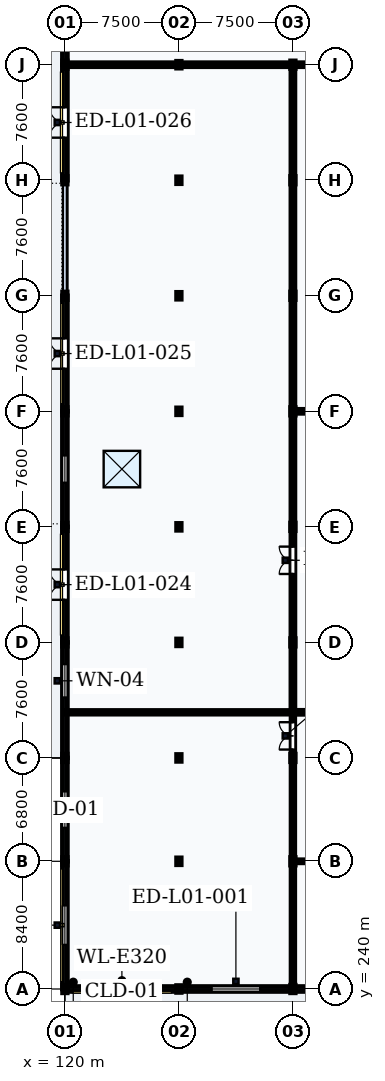
"""IFC4 building model, lengths in metres.
Left out: names, types, materials, properties, quantities, classifications, styles, units other than length and angle.
Written with IfcOpenShell. Run it as: python <this file> out.ifc"""

import sys

from ifc_helpers import new_model, si_unit, direction, frame, frame_2d, origin, origin_2d, place, context, subcontext, project, spatial, rectangle, i_section, extrude, element, fill, save


model = new_model("IFC4")
c1 = context("Model", 3, precision=1e-05, world=origin(), true_north=direction((0.0, 1.0)))
c2 = subcontext(c1, "Body", "Model", "MODEL_VIEW")
j1 = project(units=[si_unit("LENGTHUNIT", "METRE"), si_unit("PLANEANGLEUNIT", "RADIAN")], contexts=[c1])
p1 = place(None, origin())
s1 = spatial("IfcSite", under=j1, at=p1, CompositionType="ELEMENT")
p2 = place(p1, origin())
s2 = spatial("IfcBuilding", under=s1, at=p2, CompositionType="ELEMENT")
p3 = place(p2, origin())
s3 = spatial("IfcBuildingStorey", under=s2, at=p3, CompositionType="ELEMENT", Elevation=0.0)
for number, where, z_axis, x_axis in (
    (1, (120.0, 240.0, 0.0), (0.0, 0.0, 1.0), (1.0, 0.0, 0.0)),
    (2, (120.0, 248.4, 0.0), (0.0, 0.0, 1.0), (1.0, 0.0, 0.0)),
    (3, (120.0, 255.2, 0.0), (0.0, 0.0, 1.0), (1.0, 0.0, 0.0)),
    (4, (120.0, 262.8, 0.0), (0.0, 0.0, 1.0), (1.0, 0.0, 0.0)),
    (5, (120.0, 270.4, 0.0), (0.0, 0.0, 1.0), (1.0, 0.0, 0.0)),
    (6, (120.0, 278.0, 0.0), (0.0, 0.0, 1.0), (1.0, 0.0, 0.0)),
    (7, (120.0, 285.6, 0.0), (0.0, 0.0, 1.0), (1.0, 0.0, 0.0)),
    (8, (120.0, 293.2, 0.0), (0.0, 0.0, 1.0), (1.0, 0.0, 0.0)),
    (9, (120.0, 300.8, 0.0), (0.0, 0.0, 1.0), (1.0, 0.0, 0.0)),
):
    element("IfcColumn", number, at=place(p3, frame(where, z_axis=z_axis, x_axis=x_axis)), inside=s3, PredefinedType="COLUMN", context=c2, shape_type="SweptSolid", body=[
        extrude(i_section(OverallWidth=0.3, OverallDepth=0.5, WebThickness=0.014, FlangeThickness=0.028, FilletRadius=0.027, at=origin_2d()), origin(), (0.0, 0.0, 1.0), 5.4),
    ])
for number, where, z_axis, x_axis in (
    (10, (127.5, 240.0, 0.0), (0.0, 0.0, 1.0), (1.0, 0.0, 0.0)),
    (11, (127.5, 248.4, 0.0), (0.0, 0.0, 1.0), (1.0, 0.0, 0.0)),
    (12, (127.5, 255.2, 0.0), (0.0, 0.0, 1.0), (1.0, 0.0, 0.0)),
    (13, (127.5, 262.8, 0.0), (0.0, 0.0, 1.0), (1.0, 0.0, 0.0)),
    (14, (127.5, 270.4, 0.0), (0.0, 0.0, 1.0), (1.0, 0.0, 0.0)),
    (15, (127.5, 278.0, 0.0), (0.0, 0.0, 1.0), (1.0, 0.0, 0.0)),
    (16, (127.5, 285.6, 0.0), (0.0, 0.0, 1.0), (1.0, 0.0, 0.0)),
    (17, (127.5, 293.2, 0.0), (0.0, 0.0, 1.0), (1.0, 0.0, 0.0)),
    (18, (127.5, 300.8, 0.0), (0.0, 0.0, 1.0), (1.0, 0.0, 0.0)),
):
    element("IfcColumn", number, at=place(p3, frame(where, z_axis=z_axis, x_axis=x_axis)), inside=s3, PredefinedType="COLUMN", context=c2, shape_type="SweptSolid", body=[
        extrude(i_section(OverallWidth=0.3, OverallDepth=0.45, WebThickness=0.014, FlangeThickness=0.026, FilletRadius=0.027, at=origin_2d()), origin(), (0.0, 0.0, 1.0), 5.4),
    ])
for number, where, z_axis, x_axis in (
    (19, (135.0, 240.0, 0.0), (0.0, 0.0, 1.0), (1.0, 0.0, 0.0)),
    (20, (135.0, 248.4, 0.0), (0.0, 0.0, 1.0), (1.0, 0.0, 0.0)),
    (21, (135.0, 255.2, 0.0), (0.0, 0.0, 1.0), (1.0, 0.0, 0.0)),
    (22, (135.0, 262.8, 0.0), (0.0, 0.0, 1.0), (1.0, 0.0, 0.0)),
    (23, (135.0, 270.4, 0.0), (0.0, 0.0, 1.0), (1.0, 0.0, 0.0)),
    (24, (135.0, 278.0, 0.0), (0.0, 0.0, 1.0), (1.0, 0.0, 0.0)),
    (25, (135.0, 285.6, 0.0), (0.0, 0.0, 1.0), (1.0, 0.0, 0.0)),
    (26, (135.0, 293.2, 0.0), (0.0, 0.0, 1.0), (1.0, 0.0, 0.0)),
    (27, (135.0, 300.8, 0.0), (0.0, 0.0, 1.0), (1.0, 0.0, 0.0)),
):
    element("IfcColumn", number, at=place(p3, frame(where, z_axis=z_axis, x_axis=x_axis)), inside=s3, PredefinedType="COLUMN", context=c2, shape_type="SweptSolid", body=[
        extrude(i_section(OverallWidth=0.3, OverallDepth=0.5, WebThickness=0.014, FlangeThickness=0.028, FilletRadius=0.027, at=origin_2d()), origin(), (0.0, 0.0, 1.0), 5.4),
    ])
p4 = place(p3, frame((120.006, 240.0, 0.0), z_axis=(0.0, 0.0, 1.0), x_axis=(1.0, 0.0, 0.0)))
e28 = element("IfcWall", 28, at=p4, inside=s3, PredefinedType="SOLIDWALL", context=c2, shape_type="SweptSolid", body=[
    extrude(rectangle(XDim=7.488, YDim=0.32, at=frame_2d((3.744, 0.0))), origin(), (0.0, 0.0, 1.0), 4.878),
])
p5 = place(p4, frame((2.344, 0.0, 0.95)))
e29 = element("IfcOpeningElement", 29, at=p5, cuts=e28, PredefinedType="OPENING", context=c2, shape_type="SweptSolid", body=[
    extrude(rectangle(XDim=2.8, YDim=3.2, at=frame_2d((1.4, 1.6))), frame((0.0, 0.175, 0.0), z_axis=(0.0, -1.0, 0.0), x_axis=(1.0, 0.0, 0.0)), (0.0, 0.0, 1.0), 0.35),
])
p6 = place(p3, frame((127.506, 240.0, 0.0), z_axis=(0.0, 0.0, 1.0), x_axis=(1.0, 0.0, 0.0)))
e30 = element("IfcWall", 30, at=p6, inside=s3, PredefinedType="SOLIDWALL", context=c2, shape_type="SweptSolid", body=[
    extrude(rectangle(XDim=7.488, YDim=0.32, at=frame_2d((3.744, 0.0))), origin(), (0.0, 0.0, 1.0), 4.878),
])
p7 = place(p6, frame((2.144, 0.0, 0.0)))
e31 = element("IfcOpeningElement", 31, at=p7, cuts=e30, PredefinedType="OPENING", context=c2, shape_type="SweptSolid", body=[
    extrude(rectangle(XDim=3.2, YDim=3.0, at=frame_2d((1.6, 1.5))), frame((0.0, 0.175, 0.0), z_axis=(0.0, -1.0, 0.0), x_axis=(1.0, 0.0, 0.0)), (0.0, 0.0, 1.0), 0.35),
])
p8 = place(p3, frame((135.006, 240.0, 0.0), z_axis=(0.0, 0.0, 1.0), x_axis=(1.0, 0.0, 0.0)))
e32 = element("IfcWall", 32, at=p8, inside=s3, PredefinedType="SOLIDWALL", context=c2, shape_type="SweptSolid", body=[
    extrude(rectangle(XDim=7.488, YDim=0.32, at=frame_2d((3.744, 0.0))), origin(), (0.0, 0.0, 1.0), 4.878),
])
p9 = place(p8, frame((2.544, 0.0, 0.95)))
e33 = element("IfcOpeningElement", 33, at=p9, cuts=e32, PredefinedType="OPENING", context=c2, shape_type="SweptSolid", body=[
    extrude(rectangle(XDim=2.4, YDim=2.8, at=frame_2d((1.2, 1.4))), frame((0.0, 0.175, 0.0), z_axis=(0.0, -1.0, 0.0), x_axis=(1.0, 0.0, 0.0)), (0.0, 0.0, 1.0), 0.35),
])
p10 = place(p3, frame((120.0, 240.006, 0.0), z_axis=(0.0, 0.0, 1.0), x_axis=(0.0, 1.0, 0.0)))
e34 = element("IfcWall", 34, at=p10, inside=s3, PredefinedType="SOLIDWALL", context=c2, shape_type="SweptSolid", body=[
    extrude(rectangle(XDim=8.388, YDim=0.32, at=frame_2d((4.194, 0.0))), origin(), (0.0, 0.0, 1.0), 4.838),
])
p11 = place(p10, frame((2.894, 0.0, 0.95)))
e35 = element("IfcOpeningElement", 35, at=p11, cuts=e34, PredefinedType="OPENING", context=c2, shape_type="SweptSolid", body=[
    extrude(rectangle(XDim=2.6, YDim=3.0, at=frame_2d((1.3, 1.5))), frame((0.0, 0.175, 0.0), z_axis=(0.0, -1.0, 0.0), x_axis=(1.0, 0.0, 0.0)), (0.0, 0.0, 1.0), 0.35),
])
p12 = place(p3, frame((120.0, 248.406, 0.0), z_axis=(0.0, 0.0, 1.0), x_axis=(0.0, 1.0, 0.0)))
e36 = element("IfcWall", 36, at=p12, inside=s3, PredefinedType="SOLIDWALL", context=c2, shape_type="SweptSolid", body=[
    extrude(rectangle(XDim=6.788, YDim=0.32, at=frame_2d((3.394, 0.0))), origin(), (0.0, 0.0, 1.0), 4.918),
])
p13 = place(p12, frame((2.194, 0.0, 0.95)))
e37 = element("IfcOpeningElement", 37, at=p13, cuts=e36, PredefinedType="OPENING", context=c2, shape_type="SweptSolid", body=[
    extrude(rectangle(XDim=2.4, YDim=2.8, at=frame_2d((1.2, 1.4))), frame((0.0, 0.175, 0.0), z_axis=(0.0, -1.0, 0.0), x_axis=(1.0, 0.0, 0.0)), (0.0, 0.0, 1.0), 0.35),
])
p14 = place(p3, frame((120.0, 255.206, 0.0), z_axis=(0.0, 0.0, 1.0), x_axis=(0.0, 1.0, 0.0)))
e38 = element("IfcWall", 38, at=p14, inside=s3, PredefinedType="SOLIDWALL", context=c2, shape_type="SweptSolid", body=[
    extrude(rectangle(XDim=7.588, YDim=0.32, at=frame_2d((3.794, 0.0))), origin(), (0.0, 0.0, 1.0), 4.878),
])
p15 = place(p14, frame((3.966, 0.0, 0.95)))
e39 = element("IfcOpeningElement", 39, at=p15, cuts=e38, PredefinedType="OPENING", context=c2, shape_type="SweptSolid", body=[
    extrude(rectangle(XDim=2.2, YDim=2.8, at=frame_2d((1.1, 1.4))), frame((0.0, 0.175, 0.0), z_axis=(0.0, -1.0, 0.0), x_axis=(1.0, 0.0, 0.0)), (0.0, 0.0, 1.0), 0.35),
])
p16 = place(p3, frame((120.0, 262.806, 0.0), z_axis=(0.0, 0.0, 1.0), x_axis=(0.0, 1.0, 0.0)))
e40 = element("IfcWall", 40, at=p16, inside=s3, PredefinedType="SOLIDWALL", context=c2, shape_type="SweptSolid", body=[
    extrude(rectangle(XDim=7.588, YDim=0.32, at=frame_2d((3.794, 0.0))), origin(), (0.0, 0.0, 1.0), 4.878),
])
p17 = place(p16, frame((2.794, 0.0, 0.0)))
e41 = element("IfcOpeningElement", 41, at=p17, cuts=e40, PredefinedType="OPENING", context=c2, shape_type="SweptSolid", body=[
    extrude(rectangle(XDim=2.0, YDim=2.55, at=frame_2d((1.0, 1.275))), frame((0.0, 0.175, 0.0), z_axis=(0.0, -1.0, 0.0), x_axis=(1.0, 0.0, 0.0)), (0.0, 0.0, 1.0), 0.35),
])
p18 = place(p3, frame((120.0, 270.406, 0.0), z_axis=(0.0, 0.0, 1.0), x_axis=(0.0, 1.0, 0.0)))
e42 = element("IfcWall", 42, at=p18, inside=s3, PredefinedType="SOLIDWALL", context=c2, shape_type="SweptSolid", body=[
    extrude(rectangle(XDim=7.588, YDim=0.32, at=frame_2d((3.794, 0.0))), origin(), (0.0, 0.0, 1.0), 4.878),
])
p19 = place(p18, frame((2.894, 0.0, 0.95)))
e43 = element("IfcOpeningElement", 43, at=p19, cuts=e42, PredefinedType="OPENING", context=c2, shape_type="SweptSolid", body=[
    extrude(rectangle(XDim=1.8, YDim=2.6, at=frame_2d((0.9, 1.3))), frame((0.0, 0.175, 0.0), z_axis=(0.0, -1.0, 0.0), x_axis=(1.0, 0.0, 0.0)), (0.0, 0.0, 1.0), 0.35),
])
p20 = place(p3, frame((120.0, 278.006, 0.0), z_axis=(0.0, 0.0, 1.0), x_axis=(0.0, 1.0, 0.0)))
e44 = element("IfcWall", 44, at=p20, inside=s3, PredefinedType="SOLIDWALL", context=c2, shape_type="SweptSolid", body=[
    extrude(rectangle(XDim=7.588, YDim=0.32, at=frame_2d((3.794, 0.0))), origin(), (0.0, 0.0, 1.0), 4.878),
])
p21 = place(p20, frame((2.794, 0.0, 0.0)))
e45 = element("IfcOpeningElement", 45, at=p21, cuts=e44, PredefinedType="OPENING", context=c2, shape_type="SweptSolid", body=[
    extrude(rectangle(XDim=2.0, YDim=2.55, at=frame_2d((1.0, 1.275))), frame((0.0, 0.175, 0.0), z_axis=(0.0, -1.0, 0.0), x_axis=(1.0, 0.0, 0.0)), (0.0, 0.0, 1.0), 0.35),
])
p22 = place(p3, frame((120.0, 293.206, 0.0), z_axis=(0.0, 0.0, 1.0), x_axis=(0.0, 1.0, 0.0)))
e46 = element("IfcWall", 46, at=p22, inside=s3, PredefinedType="SOLIDWALL", context=c2, shape_type="SweptSolid", body=[
    extrude(rectangle(XDim=7.588, YDim=0.32, at=frame_2d((3.794, 0.0))), origin(), (0.0, 0.0, 1.0), 4.878),
])
p23 = place(p22, frame((2.794, 0.0, 0.0)))
e47 = element("IfcOpeningElement", 47, at=p23, cuts=e46, PredefinedType="OPENING", context=c2, shape_type="SweptSolid", body=[
    extrude(rectangle(XDim=2.0, YDim=2.55, at=frame_2d((1.0, 1.275))), frame((0.0, 0.175, 0.0), z_axis=(0.0, -1.0, 0.0), x_axis=(1.0, 0.0, 0.0)), (0.0, 0.0, 1.0), 0.35),
])
p24 = place(p3, frame((120.0, 300.806, 0.0), z_axis=(0.0, 0.0, 1.0), x_axis=(0.0, 1.0, 0.0)))
e48 = element("IfcWall", 48, at=p24, inside=s3, PredefinedType="SOLIDWALL", context=c2, shape_type="SweptSolid", body=[
    extrude(rectangle(XDim=7.588, YDim=0.32, at=frame_2d((3.794, 0.0))), origin(), (0.0, 0.0, 1.0), 4.878),
])
p25 = place(p24, frame((2.494, 0.0, 0.95)))
e49 = element("IfcOpeningElement", 49, at=p25, cuts=e48, PredefinedType="OPENING", context=c2, shape_type="SweptSolid", body=[
    extrude(rectangle(XDim=2.6, YDim=3.0, at=frame_2d((1.3, 1.5))), frame((0.0, 0.175, 0.0), z_axis=(0.0, -1.0, 0.0), x_axis=(1.0, 0.0, 0.0)), (0.0, 0.0, 1.0), 0.35),
])
p26 = place(p3, frame((120.1, 240.1, 5.4), z_axis=(0.0, 0.0, 1.0), x_axis=(1.0, 0.0, 0.0)))
e50 = element("IfcWall", 50, at=p26, inside=s3, PredefinedType="PARAPET", context=c2, shape_type="SweptSolid", body=[
    extrude(rectangle(XDim=167.8, YDim=0.18, at=frame_2d((83.9, 0.0))), origin(), (0.0, 0.0, 1.0), 1.2),
])
p27 = place(p3, frame((120.1, 240.2, 5.4), z_axis=(0.0, 0.0, 1.0), x_axis=(0.0, 1.0, 0.0)))
e51 = element("IfcWall", 51, at=p27, inside=s3, PredefinedType="PARAPET", context=c2, shape_type="SweptSolid", body=[
    extrude(rectangle(XDim=8.0, YDim=0.18, at=frame_2d((4.0, 0.0))), origin(), (0.0, 0.0, 1.0), 1.2),
])
p28 = place(p3, frame((120.1, 248.6, 5.4), z_axis=(0.0, 0.0, 1.0), x_axis=(0.0, 1.0, 0.0)))
e52 = element("IfcWall", 52, at=p28, inside=s3, PredefinedType="PARAPET", context=c2, shape_type="SweptSolid", body=[
    extrude(rectangle(XDim=105.2, YDim=0.18, at=frame_2d((52.6, 0.0))), origin(), (0.0, 0.0, 1.0), 1.2),
])
p29 = place(p3, frame((135.0, 240.0, 0.0), z_axis=(0.0, 0.0, 1.0), x_axis=(0.0, 1.0, 0.0)))
e53 = element("IfcWall", 53, at=p29, inside=s3, PredefinedType="PARTITIONING", context=c2, shape_type="SweptSolid", body=[
    extrude(rectangle(XDim=18.2, YDim=0.24, at=frame_2d((9.1, 0.0))), origin(), (0.0, 0.0, 1.0), 4.688),
])
p30 = place(p29, frame((15.75, 0.0, 0.0)))
e54 = element("IfcOpeningElement", 54, at=p30, cuts=e53, PredefinedType="OPENING", context=c2, shape_type="SweptSolid", body=[
    extrude(rectangle(XDim=1.8, YDim=2.25, at=frame_2d((0.9, 1.125))), frame((0.0, 0.135, 0.0), z_axis=(0.0, -1.0, 0.0), x_axis=(1.0, 0.0, 0.0)), (0.0, 0.0, 1.0), 0.27),
])
p31 = place(p3, frame((120.0, 258.2, 0.0), z_axis=(0.0, 0.0, 1.0), x_axis=(1.0, 0.0, 0.0)))
e55 = element("IfcWall", 55, at=p31, inside=s3, PredefinedType="PARTITIONING", context=c2, shape_type="SweptSolid", body=[
    extrude(rectangle(XDim=15.0, YDim=0.24, at=frame_2d((7.5, 0.0))), origin(), (0.0, 0.0, 1.0), 5.14),
])
p32 = place(p3, frame((135.0, 248.4, 0.0), z_axis=(0.0, 0.0, 1.0), x_axis=(1.0, 0.0, 0.0)))
e56 = element("IfcWall", 56, at=p32, inside=s3, PredefinedType="PARTITIONING", context=c2, shape_type="SweptSolid", body=[
    extrude(rectangle(XDim=15.0, YDim=0.2, at=frame_2d((7.5, 0.0))), origin(), (0.0, 0.0, 1.0), 4.778),
])
p33 = place(p32, frame((8.04, 0.0, 0.0)))
e57 = element("IfcOpeningElement", 57, at=p33, cuts=e56, PredefinedType="OPENING", context=c2, shape_type="SweptSolid", body=[
    extrude(rectangle(XDim=1.6, YDim=2.25, at=frame_2d((0.8, 1.125))), frame((0.0, 0.115, 0.0), z_axis=(0.0, -1.0, 0.0), x_axis=(1.0, 0.0, 0.0)), (0.0, 0.0, 1.0), 0.23),
])
p34 = place(p3, frame((135.0, 258.2, 0.0), z_axis=(0.0, 0.0, 1.0), x_axis=(1.0, 0.0, 0.0)))
e58 = element("IfcWall", 58, at=p34, inside=s3, PredefinedType="PARTITIONING", context=c2, shape_type="SweptSolid", body=[
    extrude(rectangle(XDim=30.0, YDim=0.26, at=frame_2d((15.0, 0.0))), origin(), (0.0, 0.0, 1.0), 5.14),
])
p35 = place(p34, frame((5.16, 0.0, 0.0)))
e59 = element("IfcOpeningElement", 59, at=p35, cuts=e58, PredefinedType="OPENING", context=c2, shape_type="SweptSolid", body=[
    extrude(rectangle(XDim=1.8, YDim=2.4, at=frame_2d((0.9, 1.2))), frame((0.0, 0.145, 0.0), z_axis=(0.0, -1.0, 0.0), x_axis=(1.0, 0.0, 0.0)), (0.0, 0.0, 1.0), 0.29),
])
p36 = place(p34, frame((25.35, 0.0, 0.0)))
e60 = element("IfcOpeningElement", 60, at=p36, cuts=e58, PredefinedType="OPENING", context=c2, shape_type="SweptSolid", body=[
    extrude(rectangle(XDim=1.8, YDim=2.4, at=frame_2d((0.9, 1.2))), frame((0.0, 0.145, 0.0), z_axis=(0.0, -1.0, 0.0), x_axis=(1.0, 0.0, 0.0)), (0.0, 0.0, 1.0), 0.29),
])
p37 = place(p3, frame((120.0, 300.8, 0.0), z_axis=(0.0, 0.0, 1.0), x_axis=(1.0, 0.0, 0.0)))
e61 = element("IfcWall", 61, at=p37, inside=s3, PredefinedType="PARTITIONING", context=c2, shape_type="SweptSolid", body=[
    extrude(rectangle(XDim=37.5, YDim=0.26, at=frame_2d((18.75, 0.0))), origin(), (0.0, 0.0, 1.0), 4.788),
])
p38 = place(p37, frame((24.2, 0.0, 0.0)))
e62 = element("IfcOpeningElement", 62, at=p38, cuts=e61, PredefinedType="OPENING", context=c2, shape_type="SweptSolid", body=[
    extrude(rectangle(XDim=1.6, YDim=2.25, at=frame_2d((0.8, 1.125))), frame((0.0, 0.145, 0.0), z_axis=(0.0, -1.0, 0.0), x_axis=(1.0, 0.0, 0.0)), (0.0, 0.0, 1.0), 0.29),
])
p39 = place(p3, frame((135.0, 258.2, 0.0), z_axis=(0.0, 0.0, 1.0), x_axis=(0.0, 1.0, 0.0)))
e63 = element("IfcWall", 63, at=p39, inside=s3, PredefinedType="PARTITIONING", context=c2, shape_type="SweptSolid", body=[
    extrude(rectangle(XDim=42.6, YDim=0.26, at=frame_2d((21.3, 0.0))), origin(), (0.0, 0.0, 1.0), 4.778),
])
p40 = place(p39, frame((9.1, 0.0, 0.0)))
e64 = element("IfcOpeningElement", 64, at=p40, cuts=e63, PredefinedType="OPENING", context=c2, shape_type="SweptSolid", body=[
    extrude(rectangle(XDim=1.8, YDim=2.4, at=frame_2d((0.9, 1.2))), frame((0.0, 0.145, 0.0), z_axis=(0.0, -1.0, 0.0), x_axis=(1.0, 0.0, 0.0)), (0.0, 0.0, 1.0), 0.29),
])
p41 = place(p3, frame((135.0, 278.0, 0.0), z_axis=(0.0, 0.0, 1.0), x_axis=(1.0, 0.0, 0.0)))
e65 = element("IfcWall", 65, at=p41, inside=s3, PredefinedType="PARTITIONING", context=c2, shape_type="SweptSolid", body=[
    extrude(rectangle(XDim=22.5, YDim=0.26, at=frame_2d((11.25, 0.0))), origin(), (0.0, 0.0, 1.0), 4.778),
])
p42 = place(p41, frame((10.1, 0.0, 0.0)))
e66 = element("IfcOpeningElement", 66, at=p42, cuts=e65, PredefinedType="OPENING", context=c2, shape_type="SweptSolid", body=[
    extrude(rectangle(XDim=1.8, YDim=2.4, at=frame_2d((0.9, 1.2))), frame((0.0, 0.145, 0.0), z_axis=(0.0, -1.0, 0.0), x_axis=(1.0, 0.0, 0.0)), (0.0, 0.0, 1.0), 0.29),
])
p43 = place(p5, origin())
e67 = element("IfcWindow", 67, at=p43, inside=s3, PartitioningType="DOUBLE_PANEL_VERTICAL", PredefinedType="WINDOW", context=c2, shape_type="SweptSolid", body=[
    extrude(rectangle(XDim=2.8, YDim=3.2, at=frame_2d((1.4, 1.6))), frame((0.0, 0.03, 0.0), z_axis=(0.0, -1.0, 0.0), x_axis=(1.0, 0.0, 0.0)), (0.0, 0.0, 1.0), 0.06),
])
fill(e29, e67)
p44 = place(p7, frame((3.2, 0.0, 0.0), z_axis=(0.0, 0.0, 1.0), x_axis=(-1.0, 0.0, 0.0)))
e68 = element("IfcDoor", 68, at=p44, inside=s3, OperationType="ROLLINGUP", PredefinedType="DOOR", context=c2, shape_type="SweptSolid", body=[
    extrude(rectangle(XDim=3.2, YDim=3.0, at=frame_2d((1.6, 1.5))), frame((0.0, 0.025, 0.0), z_axis=(0.0, -1.0, 0.0), x_axis=(1.0, 0.0, 0.0)), (0.0, 0.0, 1.0), 0.05),
])
fill(e31, e68)
p45 = place(p11, origin())
e69 = element("IfcWindow", 69, at=p45, inside=s3, PartitioningType="DOUBLE_PANEL_VERTICAL", PredefinedType="WINDOW", context=c2, shape_type="SweptSolid", body=[
    extrude(rectangle(XDim=2.6, YDim=3.0, at=frame_2d((1.3, 1.5))), frame((0.0, 0.03, 0.0), z_axis=(0.0, -1.0, 0.0), x_axis=(1.0, 0.0, 0.0)), (0.0, 0.0, 1.0), 0.06),
])
fill(e35, e69)
p46 = place(p13, origin())
e70 = element("IfcWindow", 70, at=p46, inside=s3, PartitioningType="DOUBLE_PANEL_VERTICAL", PredefinedType="WINDOW", context=c2, shape_type="SweptSolid", body=[
    extrude(rectangle(XDim=2.4, YDim=2.8, at=frame_2d((1.2, 1.4))), frame((0.0, 0.03, 0.0), z_axis=(0.0, -1.0, 0.0), x_axis=(1.0, 0.0, 0.0)), (0.0, 0.0, 1.0), 0.06),
])
fill(e37, e70)
p47 = place(p15, origin())
e71 = element("IfcWindow", 71, at=p47, inside=s3, PartitioningType="DOUBLE_PANEL_VERTICAL", PredefinedType="WINDOW", context=c2, shape_type="SweptSolid", body=[
    extrude(rectangle(XDim=2.2, YDim=2.8, at=frame_2d((1.1, 1.4))), frame((0.0, 0.03, 0.0), z_axis=(0.0, -1.0, 0.0), x_axis=(1.0, 0.0, 0.0)), (0.0, 0.0, 1.0), 0.06),
])
fill(e39, e71)
p48 = place(p17, origin())
e72 = element("IfcDoor", 72, at=p48, inside=s3, OperationType="DOUBLE_DOOR_SINGLE_SWING", PredefinedType="DOOR", context=c2, shape_type="SweptSolid", body=[
    extrude(rectangle(XDim=2.0, YDim=2.55, at=frame_2d((1.0, 1.275))), frame((0.0, 0.025, 0.0), z_axis=(0.0, -1.0, 0.0), x_axis=(1.0, 0.0, 0.0)), (0.0, 0.0, 1.0), 0.05),
])
fill(e41, e72)
p49 = place(p19, origin())
e73 = element("IfcWindow", 73, at=p49, inside=s3, PartitioningType="DOUBLE_PANEL_VERTICAL", PredefinedType="WINDOW", context=c2, shape_type="SweptSolid", body=[
    extrude(rectangle(XDim=1.8, YDim=2.6, at=frame_2d((0.9, 1.3))), frame((0.0, 0.03, 0.0), z_axis=(0.0, -1.0, 0.0), x_axis=(1.0, 0.0, 0.0)), (0.0, 0.0, 1.0), 0.06),
])
fill(e43, e73)
p50 = place(p21, origin())
e74 = element("IfcDoor", 74, at=p50, inside=s3, OperationType="DOUBLE_DOOR_SINGLE_SWING", PredefinedType="DOOR", context=c2, shape_type="SweptSolid", body=[
    extrude(rectangle(XDim=2.0, YDim=2.55, at=frame_2d((1.0, 1.275))), frame((0.0, 0.025, 0.0), z_axis=(0.0, -1.0, 0.0), x_axis=(1.0, 0.0, 0.0)), (0.0, 0.0, 1.0), 0.05),
])
fill(e45, e74)
p51 = place(p23, origin())
e75 = element("IfcDoor", 75, at=p51, inside=s3, OperationType="DOUBLE_DOOR_SINGLE_SWING", PredefinedType="DOOR", context=c2, shape_type="SweptSolid", body=[
    extrude(rectangle(XDim=2.0, YDim=2.55, at=frame_2d((1.0, 1.275))), frame((0.0, 0.025, 0.0), z_axis=(0.0, -1.0, 0.0), x_axis=(1.0, 0.0, 0.0)), (0.0, 0.0, 1.0), 0.05),
])
fill(e47, e75)
p52 = place(p2, frame((0.0, 0.0, 5.4)))
p53 = place(p52, frame((0.0, 0.0, -0.25)))
p54 = place(p53, frame((123.75, 274.2, -0.01)))
p55 = place(p54, frame((0.0, 0.0, 0.21)))
e76 = element("IfcWindow", 76, at=p55, inside=s3, PartitioningType="SINGLE_PANEL", PredefinedType="SKYLIGHT", context=c2, shape_type="SweptSolid", body=[
    extrude(rectangle(XDim=2.4, YDim=2.4, at=origin_2d()), origin(), (0.0, 0.0, 1.0), 0.05),
])
p56 = place(p30, origin())
e77 = element("IfcDoor", 77, at=p56, inside=s3, OperationType="DOUBLE_DOOR_SINGLE_SWING", PredefinedType="DOOR", context=c2, shape_type="SweptSolid", body=[
    extrude(rectangle(XDim=1.8, YDim=2.25, at=frame_2d((0.9, 1.125))), frame((0.0, 0.025, 0.0), z_axis=(0.0, -1.0, 0.0), x_axis=(1.0, 0.0, 0.0)), (0.0, 0.0, 1.0), 0.05),
])
fill(e54, e77)
p57 = place(p40, origin())
e78 = element("IfcDoor", 78, at=p57, inside=s3, OperationType="DOUBLE_DOOR_SINGLE_SWING", PredefinedType="DOOR", context=c2, shape_type="SweptSolid", body=[
    extrude(rectangle(XDim=1.8, YDim=2.4, at=frame_2d((0.9, 1.2))), frame((0.0, 0.025, 0.0), z_axis=(0.0, -1.0, 0.0), x_axis=(1.0, 0.0, 0.0)), (0.0, 0.0, 1.0), 0.05),
])
fill(e64, e78)
save(model, sys.argv[1])
